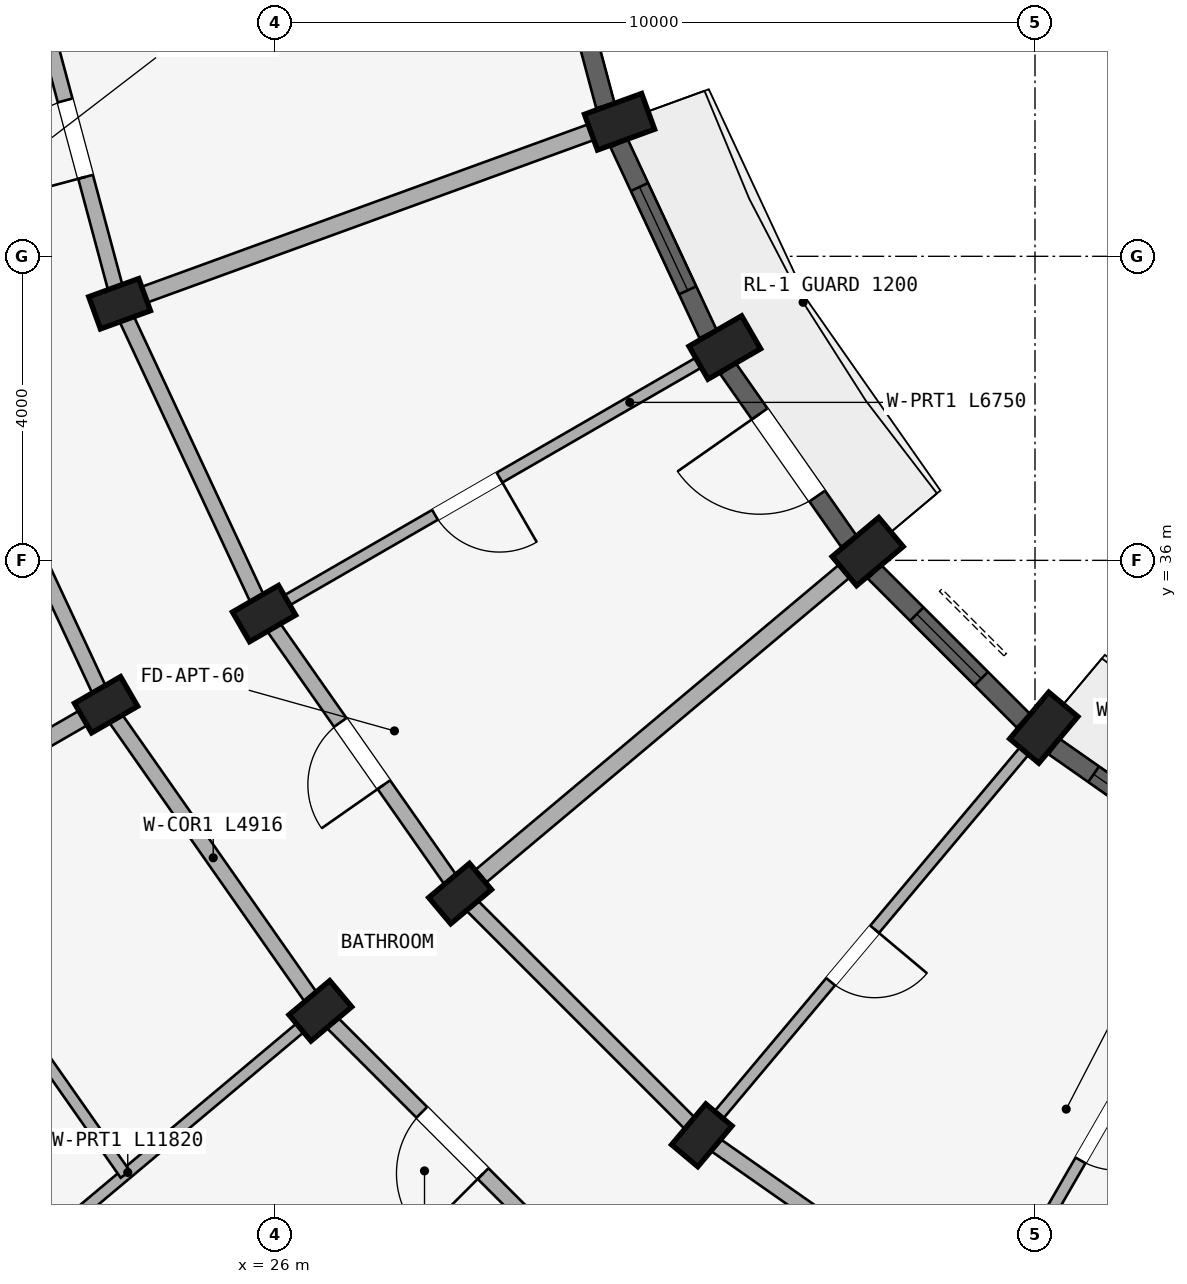
"""IFC4 building model, lengths in metres.
Left out: names, types, materials, properties, quantities, classifications, styles, units other than length and angle.
Written with IfcOpenShell. Run it as: python <this file> out.ifc"""

import sys

from ifc_helpers import new_model, si_unit, direction, frame, frame_2d, origin, origin_2d, place, context, subcontext, project, spatial, rectangle, extrude, element, fill, save


model = new_model("IFC4")
c1 = context("Model", 3, precision=1e-05, world=origin(), true_north=direction((0.0, 1.0)))
c2 = subcontext(c1, "Body", "Model", "MODEL_VIEW")
j1 = project(units=[si_unit("LENGTHUNIT", "METRE"), si_unit("PLANEANGLEUNIT", "RADIAN")], contexts=[c1])
p1 = place(None, origin())
s1 = spatial("IfcSite", under=j1, at=p1, CompositionType="ELEMENT")
p2 = place(p1, origin())
s2 = spatial("IfcBuilding", under=s1, at=p2, CompositionType="ELEMENT")
p3 = place(p2, frame((0.0, 0.0, 24.45)))
s3 = spatial("IfcBuildingStorey", under=s2, at=p3, CompositionType="ELEMENT", Elevation=24.45)
p4 = place(p3, frame((36.115, 33.798, 0.0), z_axis=(0.0, 0.0, 1.0), x_axis=(-0.766044443119, 0.642787609687, 0.0)))
e1 = element("IfcColumn", 1, at=p4, inside=s3, PredefinedType="COLUMN", context=c2, shape_type="SweptSolid", body=[
    extrude(rectangle(XDim=0.5, YDim=0.8, at=origin_2d()), origin(), (0.0, 0.0, 1.0), 2.93),
])
p5 = place(p3, frame((31.616, 28.436, 0.0), z_axis=(0.0, 0.0, 1.0), x_axis=(-0.766044443119, 0.642787609687, 0.0)))
e2 = element("IfcColumn", 2, at=p5, inside=s3, PredefinedType="COLUMN", context=c2, shape_type="SweptSolid", body=[
    extrude(rectangle(XDim=0.45, YDim=0.7, at=origin_2d()), origin(), (0.0, 0.0, 1.0), 2.93),
])
p6 = place(p3, frame((33.798, 36.115, 0.0), z_axis=(0.0, 0.0, 1.0), x_axis=(-0.642787609687, 0.766044443119, 0.0)))
e3 = element("IfcColumn", 3, at=p6, inside=s3, PredefinedType="COLUMN", context=c2, shape_type="SweptSolid", body=[
    extrude(rectangle(XDim=0.5, YDim=0.8, at=origin_2d()), origin(), (0.0, 0.0, 1.0), 2.93),
])
for number, where, z_axis, x_axis in (
    (4, (28.436, 31.616, 0.0), (0.0, 0.0, 1.0), (-0.643, 0.766, 0.0)),
    (5, (26.598, 30.073, 0.0), (0.0, 0.0, 1.0), (-0.643, 0.766, 0.0)),
):
    element("IfcColumn", number, at=place(p3, frame(where, z_axis=z_axis, x_axis=x_axis)), inside=s3, PredefinedType="COLUMN", context=c2, shape_type="SweptSolid", body=[
        extrude(rectangle(XDim=0.45, YDim=0.7, at=origin_2d()), origin(), (0.0, 0.0, 1.0), 2.93),
    ])
p7 = place(p3, frame((31.919, 38.8, 0.0), z_axis=(0.0, 0.0, 1.0), x_axis=(-0.5, 0.866025403784, 0.0)))
e6 = element("IfcColumn", 6, at=p7, inside=s3, PredefinedType="COLUMN", context=c2, shape_type="SweptSolid", body=[
    extrude(rectangle(XDim=0.5, YDim=0.8, at=origin_2d()), origin(), (0.0, 0.0, 1.0), 2.93),
])
for number, where, z_axis, x_axis in (
    (7, (25.856, 35.3, 0.0), (0.0, 0.0, 1.0), (-0.5, 0.866, 0.0)),
    (8, (23.778, 34.1, 0.0), (0.0, 0.0, 1.0), (-0.5, 0.866, 0.0)),
):
    element("IfcColumn", number, at=place(p3, frame(where, z_axis=z_axis, x_axis=x_axis)), inside=s3, PredefinedType="COLUMN", context=c2, shape_type="SweptSolid", body=[
        extrude(rectangle(XDim=0.45, YDim=0.7, at=origin_2d()), origin(), (0.0, 0.0, 1.0), 2.93),
    ])
p8 = place(p3, frame((30.534, 41.77, 0.0), z_axis=(0.0, 0.0, 1.0), x_axis=(-0.342020143326, 0.939692620786, 0.0)))
e9 = element("IfcColumn", 9, at=p8, inside=s3, PredefinedType="COLUMN", context=c2, shape_type="SweptSolid", body=[
    extrude(rectangle(XDim=0.5, YDim=0.8, at=origin_2d()), origin(), (0.0, 0.0, 1.0), 2.93),
])
p9 = place(p3, frame((23.956, 39.376, 0.0), z_axis=(0.0, 0.0, 1.0), x_axis=(-0.342020143326, 0.939692620786, 0.0)))
e10 = element("IfcColumn", 10, at=p9, inside=s3, PredefinedType="COLUMN", context=c2, shape_type="SweptSolid", body=[
    extrude(rectangle(XDim=0.45, YDim=0.7, at=origin_2d()), origin(), (0.0, 0.0, 1.0), 2.93),
])
p10 = place(p3, frame((35.3, 25.856, 0.0), z_axis=(0.0, 0.0, 1.0), x_axis=(-0.819155404658, 0.573571637217, 0.0)))
e11 = element("IfcWall", 11, at=p10, inside=s3, PredefinedType="STANDARD", context=c2, shape_type="SweptSolid", body=[
    extrude(rectangle(XDim=4.497, YDim=0.2, at=frame_2d((2.249, 0.0))), origin(), (0.0, 0.0, 1.0), 2.372),
])
p11 = place(p3, frame((31.616, 28.436, 0.0), z_axis=(0.0, 0.0, 1.0), x_axis=(-0.707106781187, 0.707106781187, 0.0)))
e12 = element("IfcWall", 12, at=p11, inside=s3, PredefinedType="STANDARD", context=c2, shape_type="SweptSolid", body=[
    extrude(rectangle(XDim=4.497, YDim=0.2, at=frame_2d((2.249, 0.0))), origin(), (0.0, 0.0, 1.0), 2.372),
])
p12 = place(p3, frame((30.073, 26.598, 0.0), z_axis=(0.0, 0.0, 1.0), x_axis=(-0.707106781187, 0.707106781187, 0.0)))
e13 = element("IfcWall", 13, at=p12, inside=s3, PredefinedType="STANDARD", context=c2, shape_type="SweptSolid", body=[
    extrude(rectangle(XDim=4.916, YDim=0.2, at=frame_2d((2.458, 0.0))), origin(), (0.0, 0.0, 1.0), 2.372),
])
p13 = place(p12, frame((1.888, 0.0, 0.0)))
e14 = element("IfcOpeningElement", 14, at=p13, cuts=e13, PredefinedType="OPENING", context=c2, shape_type="SweptSolid", body=[
    extrude(rectangle(XDim=1.14, YDim=2.15, at=frame_2d((0.57, 1.075))), frame((0.0, 0.11, 0.0), z_axis=(0.0, -1.0, 0.0), x_axis=(1.0, 0.0, 0.0)), (0.0, 0.0, 1.0), 0.22),
])
p14 = place(p3, frame((28.436, 31.616, 0.0), z_axis=(0.0, 0.0, 1.0), x_axis=(-0.573571637217, 0.819155404658, 0.0)))
e15 = element("IfcWall", 15, at=p14, inside=s3, PredefinedType="STANDARD", context=c2, shape_type="SweptSolid", body=[
    extrude(rectangle(XDim=4.497, YDim=0.2, at=frame_2d((2.249, 0.0))), origin(), (0.0, 0.0, 1.0), 2.372),
])
p15 = place(p14, frame((1.749, 0.0, 0.0)))
e16 = element("IfcOpeningElement", 16, at=p15, cuts=e15, PredefinedType="OPENING", context=c2, shape_type="SweptSolid", body=[
    extrude(rectangle(XDim=1.0, YDim=2.15, at=frame_2d((0.5, 1.075))), frame((0.0, 0.11, 0.0), z_axis=(0.0, -1.0, 0.0), x_axis=(1.0, 0.0, 0.0)), (0.0, 0.0, 1.0), 0.22),
])
p16 = place(p3, frame((26.598, 30.073, 0.0), z_axis=(0.0, 0.0, 1.0), x_axis=(-0.573592335331, 0.819140911474, 0.0)))
e17 = element("IfcWall", 17, at=p16, inside=s3, PredefinedType="STANDARD", context=c2, shape_type="SweptSolid", body=[
    extrude(rectangle(XDim=4.916, YDim=0.2, at=frame_2d((2.458, 0.0))), origin(), (0.0, 0.0, 1.0), 2.372),
])
p17 = place(p3, frame((25.856, 35.3, 0.0), z_axis=(0.0, 0.0, 1.0), x_axis=(-0.422617978463, 0.906307919131, 0.0)))
e18 = element("IfcWall", 18, at=p17, inside=s3, PredefinedType="STANDARD", context=c2, shape_type="SweptSolid", body=[
    extrude(rectangle(XDim=4.497, YDim=0.2, at=frame_2d((2.249, 0.0))), origin(), (0.0, 0.0, 1.0), 2.372),
])
p18 = place(p3, frame((23.778, 34.1, 0.0), z_axis=(0.0, 0.0, 1.0), x_axis=(-0.422629854778, 0.906302381024, 0.0)))
e19 = element("IfcWall", 19, at=p18, inside=s3, PredefinedType="STANDARD", context=c2, shape_type="SweptSolid", body=[
    extrude(rectangle(XDim=4.915, YDim=0.2, at=frame_2d((2.458, 0.0))), origin(), (0.0, 0.0, 1.0), 2.372),
])
p19 = place(p18, frame((1.958, 0.0, 0.0)))
e20 = element("IfcOpeningElement", 20, at=p19, cuts=e19, PredefinedType="OPENING", context=c2, shape_type="SweptSolid", body=[
    extrude(rectangle(XDim=1.0, YDim=2.15, at=frame_2d((0.5, 1.075))), frame((0.0, 0.11, 0.0), z_axis=(0.0, -1.0, 0.0), x_axis=(1.0, 0.0, 0.0)), (0.0, 0.0, 1.0), 0.22),
])
p20 = place(p3, frame((23.956, 39.376, 0.0), z_axis=(0.0, 0.0, 1.0), x_axis=(-0.258787642463, 0.965934240054, 0.0)))
e21 = element("IfcWall", 21, at=p20, inside=s3, PredefinedType="STANDARD", context=c2, shape_type="SweptSolid", body=[
    extrude(rectangle(XDim=4.497, YDim=0.2, at=frame_2d((2.249, 0.0))), origin(), (0.0, 0.0, 1.0), 2.372),
])
p21 = place(p20, frame((1.729, 0.0, 0.0)))
e22 = element("IfcOpeningElement", 22, at=p21, cuts=e21, PredefinedType="OPENING", context=c2, shape_type="SweptSolid", body=[
    extrude(rectangle(XDim=1.04, YDim=2.15, at=frame_2d((0.52, 1.075))), frame((0.0, 0.11, 0.0), z_axis=(0.0, -1.0, 0.0), x_axis=(1.0, 0.0, 0.0)), (0.0, 0.0, 1.0), 0.22),
])
p22 = place(p3, frame((38.7, 31.746, 0.0), z_axis=(0.0, 0.0, 1.0), x_axis=(-0.499997969693, -0.866026575979, 0.0)))
e23 = element("IfcWall", 23, at=p22, inside=s3, PredefinedType="PARTITIONING", context=c2, shape_type="SweptSolid", body=[
    extrude(rectangle(XDim=6.75, YDim=0.15, at=frame_2d((3.375, 0.0))), origin(), (0.0, 0.0, 1.0), 2.372),
])
p23 = place(p22, frame((3.222, 0.0, 0.0)))
e24 = element("IfcOpeningElement", 24, at=p23, cuts=e23, PredefinedType="OPENING", context=c2, shape_type="SweptSolid", body=[
    extrude(rectangle(XDim=0.98, YDim=2.12, at=frame_2d((0.49, 1.06))), frame((0.0, 0.085, 0.0), z_axis=(0.0, -1.0, 0.0), x_axis=(1.0, 0.0, 0.0)), (0.0, 0.0, 1.0), 0.17),
])
p24 = place(p3, frame((35.987, 33.645, 0.0), z_axis=(0.0, 0.0, 1.0), x_axis=(-0.642784846501, -0.766046761698, 0.0)))
e25 = element("IfcWall", 25, at=p24, inside=s3, PredefinedType="PARTITIONING", context=c2, shape_type="SweptSolid", body=[
    extrude(rectangle(XDim=6.75, YDim=0.15, at=frame_2d((3.375, 0.0))), origin(), (0.0, 0.0, 1.0), 2.372),
])
p25 = place(p24, frame((3.262, 0.0, 0.0)))
e26 = element("IfcOpeningElement", 26, at=p25, cuts=e25, PredefinedType="OPENING", context=c2, shape_type="SweptSolid", body=[
    extrude(rectangle(XDim=0.9, YDim=2.1, at=frame_2d((0.45, 1.05))), frame((0.0, 0.085, 0.0), z_axis=(0.0, -1.0, 0.0), x_axis=(1.0, 0.0, 0.0)), (0.0, 0.0, 1.0), 0.17),
])
p26 = place(p3, frame((33.645, 35.987, 0.0), z_axis=(0.0, 0.0, 1.0), x_axis=(-0.766046761698, -0.642784846501, 0.0)))
e27 = element("IfcWall", 27, at=p26, inside=s3, PredefinedType="STANDARD", context=c2, shape_type="SweptSolid", body=[
    extrude(rectangle(XDim=6.75, YDim=0.22, at=frame_2d((3.375, 0.0))), origin(), (0.0, 0.0, 1.0), 2.372),
])
p27 = place(p3, frame((26.521, 30.009, 0.0), z_axis=(0.0, 0.0, 1.0), x_axis=(-0.766049804211, -0.642781220531, 0.0)))
e28 = element("IfcWall", 28, at=p27, inside=s3, PredefinedType="PARTITIONING", context=c2, shape_type="SweptSolid", body=[
    extrude(rectangle(XDim=11.82, YDim=0.15, at=frame_2d((5.91, 0.0))), origin(), (0.0, 0.0, 1.0), 2.372),
])
p28 = place(p27, frame((7.5, 0.0, 0.0)))
e29 = element("IfcOpeningElement", 29, at=p28, cuts=e28, PredefinedType="OPENING", context=c2, shape_type="SweptSolid", body=[
    extrude(rectangle(XDim=0.8, YDim=2.1, at=frame_2d((0.4, 1.05))), frame((0.0, 0.085, 0.0), z_axis=(0.0, -1.0, 0.0), x_axis=(1.0, 0.0, 0.0)), (0.0, 0.0, 1.0), 0.17),
])
p29 = place(p3, frame((31.746, 38.7, 0.0), z_axis=(0.0, 0.0, 1.0), x_axis=(-0.866026575979, -0.499997969693, 0.0)))
e30 = element("IfcWall", 30, at=p29, inside=s3, PredefinedType="PARTITIONING", context=c2, shape_type="SweptSolid", body=[
    extrude(rectangle(XDim=6.75, YDim=0.15, at=frame_2d((3.375, 0.0))), origin(), (0.0, 0.0, 1.0), 2.372),
])
p30 = place(p29, frame((3.222, 0.0, 0.0)))
e31 = element("IfcOpeningElement", 31, at=p30, cuts=e30, PredefinedType="OPENING", context=c2, shape_type="SweptSolid", body=[
    extrude(rectangle(XDim=0.98, YDim=2.12, at=frame_2d((0.49, 1.06))), frame((0.0, 0.085, 0.0), z_axis=(0.0, -1.0, 0.0), x_axis=(1.0, 0.0, 0.0)), (0.0, 0.0, 1.0), 0.17),
])
p31 = place(p3, frame((23.691, 34.05, 0.0), z_axis=(0.0, 0.0, 1.0), x_axis=(-0.866017730655, -0.500013290014, 0.0)))
e32 = element("IfcWall", 32, at=p31, inside=s3, PredefinedType="STANDARD", context=c2, shape_type="SweptSolid", body=[
    extrude(rectangle(XDim=11.82, YDim=0.22, at=frame_2d((5.91, 0.0))), origin(), (0.0, 0.0, 1.0), 2.372),
])
p32 = place(p3, frame((30.346, 41.702, 0.0), z_axis=(0.0, 0.0, 1.0), x_axis=(-0.939696231917, -0.342010221662, 0.0)))
e33 = element("IfcWall", 33, at=p32, inside=s3, PredefinedType="STANDARD", context=c2, shape_type="SweptSolid", body=[
    extrude(rectangle(XDim=6.75, YDim=0.22, at=frame_2d((3.375, 0.0))), origin(), (0.0, 0.0, 1.0), 2.372),
])
p33 = place(p3, frame((24.031, 27.92, 0.0), z_axis=(0.0, 0.0, 1.0), x_axis=(-0.573569599955, 0.819156831143, 0.0)))
e34 = element("IfcWall", 34, at=p33, inside=s3, PredefinedType="PLUMBINGWALL", context=c2, shape_type="SweptSolid", body=[
    extrude(rectangle(XDim=5.5, YDim=0.15, at=frame_2d((2.75, 0.0))), origin(), (0.0, 0.0, 1.0), 2.372),
])
p34 = place(p33, frame((2.35, 0.0, 0.0)))
e35 = element("IfcOpeningElement", 35, at=p34, cuts=e34, PredefinedType="OPENING", context=c2, shape_type="SweptSolid", body=[
    extrude(rectangle(XDim=0.8, YDim=2.1, at=frame_2d((0.4, 1.05))), frame((0.0, 0.085, 0.0), z_axis=(0.0, -1.0, 0.0), x_axis=(1.0, 0.0, 0.0)), (0.0, 0.0, 1.0), 0.17),
])
p35 = place(p3, frame((38.521, 31.962, 0.0), z_axis=(0.0, 0.0, 1.0), x_axis=(-0.819111815273, 0.573633885053, 0.0)))
e36 = element("IfcWall", 36, at=p35, inside=s3, PredefinedType="STANDARD", context=c2, shape_type="SweptSolid", body=[
    extrude(rectangle(XDim=2.77, YDim=0.25, at=frame_2d((1.385, 0.0))), origin(), (0.0, 0.0, 1.0), 2.422),
])
p36 = place(p35, frame((0.635, 0.0, 0.572)))
e37 = element("IfcOpeningElement", 37, at=p36, cuts=e36, PredefinedType="OPENING", context=c2, shape_type="SweptSolid", body=[
    extrude(rectangle(XDim=1.5, YDim=1.65, at=frame_2d((0.75, 0.825))), frame((0.0, 0.135, 0.0), z_axis=(0.0, -1.0, 0.0), x_axis=(1.0, 0.0, 0.0)), (0.0, 0.0, 1.0), 0.27),
])
p37 = place(p3, frame((35.848, 33.889, 0.0), z_axis=(0.0, 0.0, 1.0), x_axis=(-0.707106781187, 0.707106781187, 0.0)))
e38 = element("IfcWall", 38, at=p37, inside=s3, PredefinedType="STANDARD", context=c2, shape_type="SweptSolid", body=[
    extrude(rectangle(XDim=2.77, YDim=0.25, at=frame_2d((1.385, 0.0))), origin(), (0.0, 0.0, 1.0), 2.422),
])
p38 = place(p37, frame((0.785, 0.0, 0.722)))
e39 = element("IfcOpeningElement", 39, at=p38, cuts=e38, PredefinedType="OPENING", context=c2, shape_type="SweptSolid", body=[
    extrude(rectangle(XDim=1.2, YDim=1.5, at=frame_2d((0.6, 0.75))), frame((0.0, 0.135, 0.0), z_axis=(0.0, -1.0, 0.0), x_axis=(1.0, 0.0, 0.0)), (0.0, 0.0, 1.0), 0.27),
])
p39 = place(p3, frame((33.551, 36.252, 0.0), z_axis=(0.0, 0.0, 1.0), x_axis=(-0.573633885053, 0.819111815273, 0.0)))
e40 = element("IfcWall", 40, at=p39, inside=s3, PredefinedType="STANDARD", context=c2, shape_type="SweptSolid", body=[
    extrude(rectangle(XDim=2.77, YDim=0.25, at=frame_2d((1.385, 0.0))), origin(), (0.0, 0.0, 1.0), 2.422),
])
p40 = place(p39, frame((0.725, 0.0, 0.0)))
e41 = element("IfcOpeningElement", 41, at=p40, cuts=e40, PredefinedType="OPENING", context=c2, shape_type="SweptSolid", body=[
    extrude(rectangle(XDim=1.32, YDim=2.15, at=frame_2d((0.66, 1.075))), frame((0.0, 0.135, 0.0), z_axis=(0.0, -1.0, 0.0), x_axis=(1.0, 0.0, 0.0)), (0.0, 0.0, 1.0), 0.27),
])
p41 = place(p3, frame((31.698, 38.977, 0.0), z_axis=(0.0, 0.0, 1.0), x_axis=(-0.422649007088, 0.906293449611, 0.0)))
e42 = element("IfcWall", 42, at=p41, inside=s3, PredefinedType="STANDARD", context=c2, shape_type="SweptSolid", body=[
    extrude(rectangle(XDim=2.77, YDim=0.25, at=frame_2d((1.385, 0.0))), origin(), (0.0, 0.0, 1.0), 2.422),
])
p42 = place(p41, frame((0.635, 0.0, 0.572)))
e43 = element("IfcOpeningElement", 43, at=p42, cuts=e42, PredefinedType="OPENING", context=c2, shape_type="SweptSolid", body=[
    extrude(rectangle(XDim=1.5, YDim=1.65, at=frame_2d((0.75, 0.825))), frame((0.0, 0.135, 0.0), z_axis=(0.0, -1.0, 0.0), x_axis=(1.0, 0.0, 0.0)), (0.0, 0.0, 1.0), 0.27),
])
p43 = place(p3, frame((30.347, 41.983, 0.0), z_axis=(0.0, 0.0, 1.0), x_axis=(-0.25878161084, 0.965935855992, 0.0)))
e44 = element("IfcWall", 44, at=p43, inside=s3, PredefinedType="STANDARD", context=c2, shape_type="SweptSolid", body=[
    extrude(rectangle(XDim=2.77, YDim=0.25, at=frame_2d((1.385, 0.0))), origin(), (0.0, 0.0, 1.0), 2.422),
])
p44 = place(p43, frame((0.785, 0.0, 0.722)))
e45 = element("IfcOpeningElement", 45, at=p44, cuts=e44, PredefinedType="OPENING", context=c2, shape_type="SweptSolid", body=[
    extrude(rectangle(XDim=1.2, YDim=1.5, at=frame_2d((0.6, 0.75))), frame((0.0, 0.135, 0.0), z_axis=(0.0, -1.0, 0.0), x_axis=(1.0, 0.0, 0.0)), (0.0, 0.0, 1.0), 0.27),
])
p45 = place(p36, origin())
e46 = element("IfcWindow", 46, at=p45, inside=s3, PartitioningType="DOUBLE_PANEL_VERTICAL", PredefinedType="WINDOW", context=c2, shape_type="SweptSolid", body=[
    extrude(rectangle(XDim=1.5, YDim=1.65, at=frame_2d((0.75, 0.825))), frame((0.0, 0.03, 0.0), z_axis=(0.0, -1.0, 0.0), x_axis=(1.0, 0.0, 0.0)), (0.0, 0.0, 1.0), 0.06),
])
fill(e37, e46)
p46 = place(p38, origin())
e47 = element("IfcWindow", 47, at=p46, inside=s3, PartitioningType="SINGLE_PANEL", PredefinedType="WINDOW", context=c2, shape_type="SweptSolid", body=[
    extrude(rectangle(XDim=1.2, YDim=1.5, at=frame_2d((0.6, 0.75))), frame((0.0, 0.03, 0.0), z_axis=(0.0, -1.0, 0.0), x_axis=(1.0, 0.0, 0.0)), (0.0, 0.0, 1.0), 0.06),
])
fill(e39, e47)
p47 = place(p42, origin())
e48 = element("IfcWindow", 48, at=p47, inside=s3, PartitioningType="DOUBLE_PANEL_VERTICAL", PredefinedType="WINDOW", context=c2, shape_type="SweptSolid", body=[
    extrude(rectangle(XDim=1.5, YDim=1.65, at=frame_2d((0.75, 0.825))), frame((0.0, 0.03, 0.0), z_axis=(0.0, -1.0, 0.0), x_axis=(1.0, 0.0, 0.0)), (0.0, 0.0, 1.0), 0.06),
])
fill(e43, e48)
p48 = place(p23, origin())
e49 = element("IfcDoor", 49, at=p48, inside=s3, OperationType="SINGLE_SWING_LEFT", PredefinedType="DOOR", context=c2, shape_type="SweptSolid", body=[
    extrude(rectangle(XDim=0.98, YDim=2.12, at=frame_2d((0.49, 1.06))), frame((0.0, 0.025, 0.0), z_axis=(0.0, -1.0, 0.0), x_axis=(1.0, 0.0, 0.0)), (0.0, 0.0, 1.0), 0.05),
])
fill(e24, e49)
p49 = place(p25, frame((0.9, 0.0, 0.0), z_axis=(0.0, 0.0, 1.0), x_axis=(-1.0, 0.0, 0.0)))
e50 = element("IfcDoor", 50, at=p49, inside=s3, OperationType="SINGLE_SWING_RIGHT", PredefinedType="DOOR", context=c2, shape_type="SweptSolid", body=[
    extrude(rectangle(XDim=0.9, YDim=2.1, at=frame_2d((0.45, 1.05))), frame((0.0, 0.025, 0.0), z_axis=(0.0, -1.0, 0.0), x_axis=(1.0, 0.0, 0.0)), (0.0, 0.0, 1.0), 0.05),
])
fill(e26, e50)
p50 = place(p30, frame((0.98, 0.0, 0.0), z_axis=(0.0, 0.0, 1.0), x_axis=(-1.0, 0.0, 0.0)))
e51 = element("IfcDoor", 51, at=p50, inside=s3, OperationType="SINGLE_SWING_RIGHT", PredefinedType="DOOR", context=c2, shape_type="SweptSolid", body=[
    extrude(rectangle(XDim=0.98, YDim=2.12, at=frame_2d((0.49, 1.06))), frame((0.0, 0.025, 0.0), z_axis=(0.0, -1.0, 0.0), x_axis=(1.0, 0.0, 0.0)), (0.0, 0.0, 1.0), 0.05),
])
fill(e31, e51)
p51 = place(p13, frame((1.14, 0.0, 0.0), z_axis=(0.0, 0.0, 1.0), x_axis=(-1.0, 0.0, 0.0)))
e52 = element("IfcDoor", 52, at=p51, inside=s3, OperationType="SINGLE_SWING_RIGHT", PredefinedType="DOOR", context=c2, shape_type="SweptSolid", body=[
    extrude(rectangle(XDim=1.14, YDim=2.15, at=frame_2d((0.57, 1.075))), frame((0.0, 0.025, 0.0), z_axis=(0.0, -1.0, 0.0), x_axis=(1.0, 0.0, 0.0)), (0.0, 0.0, 1.0), 0.05),
])
fill(e14, e52)
p52 = place(p15, origin())
e53 = element("IfcDoor", 53, at=p52, inside=s3, OperationType="SINGLE_SWING_LEFT", PredefinedType="DOOR", context=c2, shape_type="SweptSolid", body=[
    extrude(rectangle(XDim=1.0, YDim=2.15, at=frame_2d((0.5, 1.075))), frame((0.0, 0.025, 0.0), z_axis=(0.0, -1.0, 0.0), x_axis=(1.0, 0.0, 0.0)), (0.0, 0.0, 1.0), 0.05),
])
fill(e16, e53)
p53 = place(p21, frame((1.04, 0.0, 0.0), z_axis=(0.0, 0.0, 1.0), x_axis=(-1.0, 0.0, 0.0)))
e54 = element("IfcDoor", 54, at=p53, inside=s3, OperationType="SINGLE_SWING_RIGHT", PredefinedType="DOOR", context=c2, shape_type="SweptSolid", body=[
    extrude(rectangle(XDim=1.04, YDim=2.15, at=frame_2d((0.52, 1.075))), frame((0.0, 0.025, 0.0), z_axis=(0.0, -1.0, 0.0), x_axis=(1.0, 0.0, 0.0)), (0.0, 0.0, 1.0), 0.05),
])
fill(e22, e54)
p54 = place(p40, frame((1.32, 0.0, 0.0), z_axis=(0.0, 0.0, 1.0), x_axis=(-1.0, 0.0, 0.0)))
e55 = element("IfcDoor", 55, at=p54, inside=s3, OperationType="SINGLE_SWING_LEFT", PredefinedType="DOOR", context=c2, shape_type="SweptSolid", body=[
    extrude(rectangle(XDim=1.32, YDim=2.15, at=frame_2d((0.66, 1.075))), frame((0.0, 0.025, 0.0), z_axis=(0.0, -1.0, 0.0), x_axis=(1.0, 0.0, 0.0)), (0.0, 0.0, 1.0), 0.05),
])
fill(e41, e55)
save(model, sys.argv[1])
